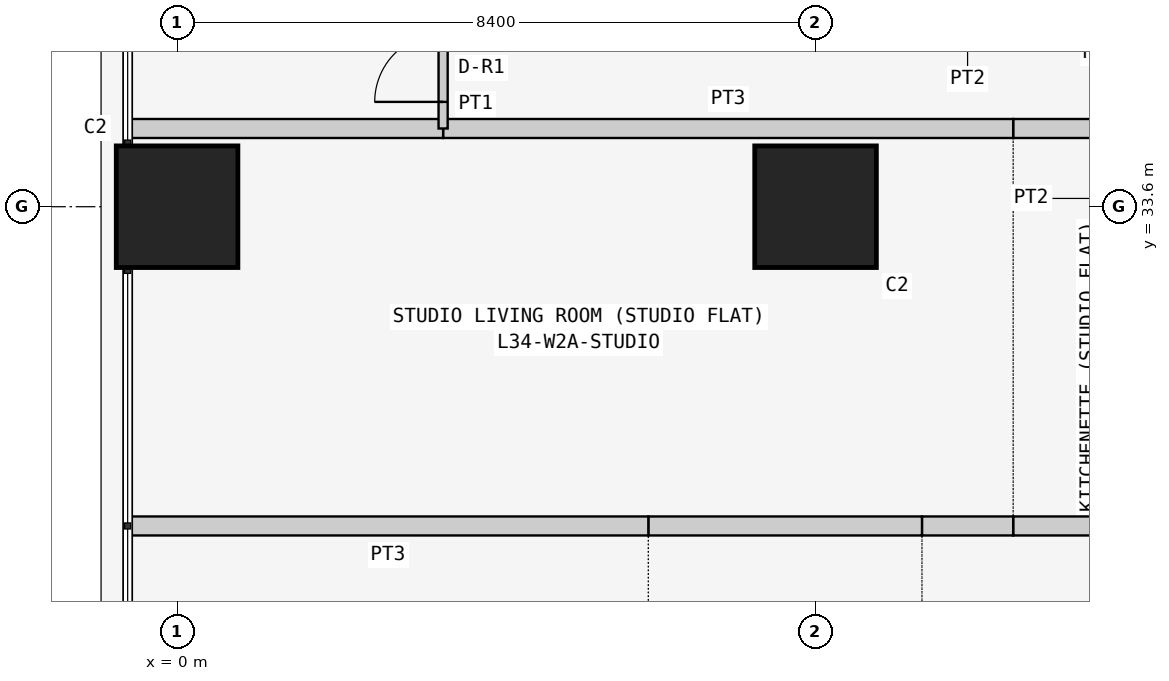
"""IFC4 building model, lengths in metres.
Left out: names, types, materials, properties, quantities, classifications, styles, units other than length and angle.
Written with IfcOpenShell. Run it as: python <this file> out.ifc"""

import sys

from ifc_helpers import new_model, si_unit, direction, frame, frame_2d, origin, origin_2d, place, context, subcontext, project, spatial, rectangle, extrude, element, fill, save


model = new_model("IFC4")
c1 = context("Model", 3, precision=1e-05, world=origin(), true_north=direction((0.0, 1.0)))
c2 = subcontext(c1, "Body", "Model", "MODEL_VIEW")
j1 = project(units=[si_unit("LENGTHUNIT", "METRE"), si_unit("PLANEANGLEUNIT", "RADIAN")], contexts=[c1])
p1 = place(None, origin())
s1 = spatial("IfcSite", under=j1, at=p1, CompositionType="ELEMENT")
p2 = place(p1, origin())
s2 = spatial("IfcBuilding", under=s1, at=p2, CompositionType="ELEMENT")
p3 = place(p2, frame((0.0, 0.0, 134.1)))
s3 = spatial("IfcBuildingStorey", under=s2, at=p3, CompositionType="ELEMENT", Elevation=134.1)
for number, where, z_axis, x_axis in (
    (1, (0.0, 33.6, 0.0), (0.0, 0.0, 1.0), (1.0, 0.0, 0.0)),
    (2, (8.4, 33.6, 0.0), (0.0, 0.0, 1.0), (1.0, 0.0, 0.0)),
):
    element("IfcColumn", number, at=place(p3, frame(where, z_axis=z_axis, x_axis=x_axis)), inside=s3, PredefinedType="COLUMN", context=c2, shape_type="SweptSolid", body=[
        extrude(rectangle(XDim=1.6, YDim=1.6, at=origin_2d()), origin(), (0.0, 0.0, 1.0), 3.6),
    ])
for number, where, z_axis, x_axis in (
    (3, (12.2, 29.4, 0.0), (0.0, 0.0, 1.0), (-1.0, 0.0, 0.0)),
    (4, (11.0, 29.4, 0.0), (0.0, 0.0, 1.0), (-1.0, 0.0, 0.0)),
):
    element("IfcWall", number, at=place(p3, frame(where, z_axis=z_axis, x_axis=x_axis)), inside=s3, PredefinedType="PARTITIONING", context=c2, shape_type="SweptSolid", body=[
        extrude(rectangle(XDim=1.2, YDim=0.25, at=frame_2d((0.6, 0.0))), origin(), (0.0, 0.0, 1.0), 3.45),
    ])
p4 = place(p3, frame((9.8, 29.4, 0.0), z_axis=(0.0, 0.0, 1.0), x_axis=(-1.0, 0.0, 0.0)))
e5 = element("IfcWall", 5, at=p4, inside=s3, PredefinedType="PARTITIONING", context=c2, shape_type="SweptSolid", body=[
    extrude(rectangle(XDim=3.6, YDim=0.25, at=frame_2d((1.8, 0.0))), origin(), (0.0, 0.0, 1.0), 3.45),
])
p5 = place(p3, frame((6.2, 29.4, 0.0), z_axis=(0.0, 0.0, 1.0), x_axis=(-1.0, 0.0, 0.0)))
e6 = element("IfcWall", 6, at=p5, inside=s3, PredefinedType="PARTITIONING", context=c2, shape_type="SweptSolid", body=[
    extrude(rectangle(XDim=6.85, YDim=0.25, at=frame_2d((3.425, 0.0))), origin(), (0.0, 0.0, 1.0), 3.45),
])
p6 = place(p3, frame((11.0, 34.629, 0.0), z_axis=(0.0, 0.0, 1.0), x_axis=(1.0, 0.0, 0.0)))
e7 = element("IfcWall", 7, at=p6, inside=s3, PredefinedType="PARTITIONING", context=c2, shape_type="SweptSolid", body=[
    extrude(rectangle(XDim=2.4, YDim=0.25, at=frame_2d((1.2, 0.0))), origin(), (0.0, 0.0, 1.0), 3.45),
])
p7 = place(p3, frame((3.5, 34.629, 0.0), z_axis=(0.0, 0.0, 1.0), x_axis=(1.0, 0.0, 0.0)))
e8 = element("IfcWall", 8, at=p7, inside=s3, PredefinedType="PARTITIONING", context=c2, shape_type="SweptSolid", body=[
    extrude(rectangle(XDim=7.5, YDim=0.25, at=frame_2d((3.75, 0.0))), origin(), (0.0, 0.0, 1.0), 3.45),
])
p8 = place(p3, frame((-0.65, 34.629, 0.0), z_axis=(0.0, 0.0, 1.0), x_axis=(1.0, 0.0, 0.0)))
e9 = element("IfcWall", 9, at=p8, inside=s3, PredefinedType="PARTITIONING", context=c2, shape_type="SweptSolid", body=[
    extrude(rectangle(XDim=4.15, YDim=0.25, at=frame_2d((2.075, 0.0))), origin(), (0.0, 0.0, 1.0), 3.45),
])
p9 = place(p3, frame((3.5, 34.629, 0.0), z_axis=(0.0, 0.0, 1.0), x_axis=(0.0, 1.0, 0.0)))
e10 = element("IfcWall", 10, at=p9, inside=s3, PredefinedType="PARTITIONING", context=c2, shape_type="SweptSolid", body=[
    extrude(rectangle(XDim=1.6, YDim=0.12, at=frame_2d((0.8, 0.0))), origin(), (0.0, 0.0, 1.0), 3.45),
])
p10 = place(p9, frame((0.35, 0.0, 0.0)))
e11 = element("IfcOpeningElement", 11, at=p10, cuts=e10, PredefinedType="OPENING", context=c2, shape_type="SweptSolid", body=[
    extrude(rectangle(XDim=0.9, YDim=2.1, at=frame_2d((0.45, 1.05))), frame((0.0, 0.07, 0.0), z_axis=(0.0, -1.0, 0.0), x_axis=(1.0, 0.0, 0.0)), (0.0, 0.0, 1.0), 0.14),
])
p11 = place(p10, origin())
e12 = element("IfcDoor", 12, at=p11, inside=s3, OperationType="SINGLE_SWING_LEFT", PredefinedType="DOOR", context=c2, shape_type="SweptSolid", body=[
    extrude(rectangle(XDim=0.9, YDim=2.1, at=frame_2d((0.45, 1.05))), frame((0.0, 0.025, 0.0), z_axis=(0.0, -1.0, 0.0), x_axis=(1.0, 0.0, 0.0)), (0.0, 0.0, 1.0), 0.05),
])
fill(e11, e12)
save(model, sys.argv[1])
